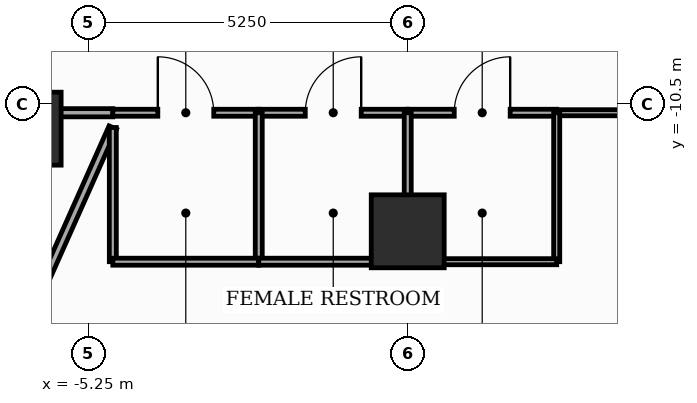
"""IFC4 building model, lengths in metres.
Left out: names, types, materials, properties, quantities, classifications, styles, units other than length and angle.
Written with IfcOpenShell. Run it as: python <this file> out.ifc"""

import sys

from ifc_helpers import new_model, si_unit, direction, frame, frame_2d, origin, origin_2d, place, context, subcontext, project, spatial, rectangle, extrude, element, fill, save


model = new_model("IFC4")
c1 = context("Model", 3, precision=1e-05, world=origin(), true_north=direction((0.0, 1.0)))
c2 = subcontext(c1, "Body", "Model", "MODEL_VIEW")
j1 = project(units=[si_unit("LENGTHUNIT", "METRE"), si_unit("PLANEANGLEUNIT", "RADIAN")], contexts=[c1])
p1 = place(None, origin())
s1 = spatial("IfcSite", under=j1, at=p1, CompositionType="ELEMENT")
p2 = place(p1, origin())
s2 = spatial("IfcBuilding", under=s1, at=p2, CompositionType="ELEMENT")
p3 = place(p2, frame((0.0, 0.0, 176.8)))
s3 = spatial("IfcBuildingStorey", under=s2, at=p3, CompositionType="ELEMENT", Elevation=176.8)
for number, where, z_axis, x_axis in (
    (1, (-6.3, -10.912, 0.0), (0.0, 0.0, 1.0), (1.0, 0.0, 0.0)),
    (2, (0.0, -12.6, 0.0), (0.0, 0.0, 1.0), (1.0, 0.0, 0.0)),
):
    element("IfcColumn", number, at=place(p3, frame(where, z_axis=z_axis, x_axis=x_axis)), inside=s3, PredefinedType="COLUMN", context=c2, shape_type="SweptSolid", body=[
        extrude(rectangle(XDim=1.2, YDim=1.2, at=origin_2d()), origin(), (0.0, 0.0, 1.0), 3.7),
    ])
p4 = place(p3, frame((-10.15, -10.65, 0.0), z_axis=(0.0, 0.0, 1.0), x_axis=(1.0, 0.0, 0.0)))
e3 = element("IfcWall", 3, at=p4, inside=s3, PredefinedType="PARTITIONING", context=c2, shape_type="SweptSolid", body=[
    extrude(rectangle(XDim=5.3, YDim=0.135, at=frame_2d((2.65, 0.0))), origin(), (0.0, 0.0, 1.0), 2.885),
])
p5 = place(p4, frame((0.585, 0.0, 0.0)))
e4 = element("IfcOpeningElement", 4, at=p5, cuts=e3, PredefinedType="OPENING", context=c2, shape_type="SweptSolid", body=[
    extrude(rectangle(XDim=0.95, YDim=2.1, at=frame_2d((0.475, 1.05))), frame((0.0, 0.077, 0.0), z_axis=(0.0, -1.0, 0.0), x_axis=(1.0, 0.0, 0.0)), (0.0, 0.0, 1.0), 0.155),
])
p6 = place(p3, frame((-4.85, -10.65, 0.0), z_axis=(0.0, 0.0, 1.0), x_axis=(1.0, 0.0, 0.0)))
e5 = element("IfcWall", 5, at=p6, inside=s3, PredefinedType="PARTITIONING", context=c2, shape_type="SweptSolid", body=[
    extrude(rectangle(XDim=2.4, YDim=0.115, at=frame_2d((1.2, 0.0))), origin(), (0.0, 0.0, 1.0), 3.5),
])
p7 = place(p6, frame((0.74, 0.0, 0.0)))
e6 = element("IfcOpeningElement", 6, at=p7, cuts=e5, PredefinedType="OPENING", context=c2, shape_type="SweptSolid", body=[
    extrude(rectangle(XDim=0.92, YDim=2.1, at=frame_2d((0.46, 1.05))), frame((0.0, 0.067, 0.0), z_axis=(0.0, -1.0, 0.0), x_axis=(1.0, 0.0, 0.0)), (0.0, 0.0, 1.0), 0.135),
])
p8 = place(p3, frame((-2.45, -10.65, 0.0), z_axis=(0.0, 0.0, 1.0), x_axis=(1.0, 0.0, 0.0)))
e7 = element("IfcWall", 7, at=p8, inside=s3, PredefinedType="PARTITIONING", context=c2, shape_type="SweptSolid", body=[
    extrude(rectangle(XDim=2.45, YDim=0.115, at=frame_2d((1.225, 0.0))), origin(), (0.0, 0.0, 1.0), 2.885),
])
p9 = place(p8, frame((0.765, 0.0, 0.0)))
e8 = element("IfcOpeningElement", 8, at=p9, cuts=e7, PredefinedType="OPENING", context=c2, shape_type="SweptSolid", body=[
    extrude(rectangle(XDim=0.92, YDim=2.1, at=frame_2d((0.46, 1.05))), frame((0.0, 0.067, 0.0), z_axis=(0.0, -1.0, 0.0), x_axis=(1.0, 0.0, 0.0)), (0.0, 0.0, 1.0), 0.135),
])
p10 = place(p3, frame((2.45, -10.65, 0.0), z_axis=(0.0, 0.0, 1.0), x_axis=(1.0, 0.0, 0.0)))
e9 = element("IfcWall", 9, at=p10, inside=s3, PredefinedType="MOVABLE", context=c2, shape_type="SweptSolid", body=[
    extrude(rectangle(XDim=7.7, YDim=0.1, at=frame_2d((3.85, 0.0))), origin(), (0.0, 0.0, 1.0), 2.885),
])
p11 = place(p3, frame((0.0, -10.65, 0.0), z_axis=(0.0, 0.0, 1.0), x_axis=(1.0, 0.0, 0.0)))
e10 = element("IfcWall", 10, at=p11, inside=s3, PredefinedType="PARTITIONING", context=c2, shape_type="SweptSolid", body=[
    extrude(rectangle(XDim=2.45, YDim=0.115, at=frame_2d((1.225, 0.0))), origin(), (0.0, 0.0, 1.0), 3.5),
])
p12 = place(p11, frame((0.765, 0.0, 0.0)))
e11 = element("IfcOpeningElement", 11, at=p12, cuts=e10, PredefinedType="OPENING", context=c2, shape_type="SweptSolid", body=[
    extrude(rectangle(XDim=0.92, YDim=2.1, at=frame_2d((0.46, 1.05))), frame((0.0, 0.067, 0.0), z_axis=(0.0, -1.0, 0.0), x_axis=(1.0, 0.0, 0.0)), (0.0, 0.0, 1.0), 0.135),
])
p13 = place(p3, frame((-6.402, -14.378, 0.0), z_axis=(0.0, 0.0, 1.0), x_axis=(0.406833086098, 0.913502512343, 0.0)))
e12 = element("IfcWall", 12, at=p13, inside=s3, PredefinedType="PARTITIONING", context=c2, shape_type="SweptSolid", body=[
    extrude(rectangle(XDim=3.815, YDim=0.135, at=frame_2d((1.907, 0.0))), origin(), (0.0, 0.0, 1.0), 2.885),
])
p14 = place(p3, frame((-2.45, -13.1, 0.0), z_axis=(0.0, 0.0, 1.0), x_axis=(0.0, 1.0, 0.0)))
e13 = element("IfcWall", 13, at=p14, inside=s3, PredefinedType="PARTITIONING", context=c2, shape_type="SweptSolid", body=[
    extrude(rectangle(XDim=2.45, YDim=0.115, at=frame_2d((1.225, 0.0))), origin(), (0.0, 0.0, 1.0), 2.885),
])
p15 = place(p3, frame((-4.85, -10.893, 0.0), z_axis=(0.0, 0.0, 1.0), x_axis=(0.0, -1.0, 0.0)))
e14 = element("IfcWall", 14, at=p15, inside=s3, PredefinedType="PARTITIONING", context=c2, shape_type="SweptSolid", body=[
    extrude(rectangle(XDim=2.207, YDim=0.115, at=frame_2d((1.104, 0.0))), origin(), (0.0, 0.0, 1.0), 2.885),
])
p16 = place(p3, frame((-4.85, -13.1, 0.0), z_axis=(0.0, 0.0, 1.0), x_axis=(1.0, 0.0, 0.0)))
e15 = element("IfcWall", 15, at=p16, inside=s3, PredefinedType="PARTITIONING", context=c2, shape_type="SweptSolid", body=[
    extrude(rectangle(XDim=2.4, YDim=0.115, at=frame_2d((1.2, 0.0))), origin(), (0.0, 0.0, 1.0), 3.5),
])
p17 = place(p3, frame((-2.45, -13.1, 0.0), z_axis=(0.0, 0.0, 1.0), x_axis=(1.0, 0.0, 0.0)))
e16 = element("IfcWall", 16, at=p17, inside=s3, PredefinedType="PARTITIONING", context=c2, shape_type="SweptSolid", body=[
    extrude(rectangle(XDim=2.45, YDim=0.115, at=frame_2d((1.225, 0.0))), origin(), (0.0, 0.0, 1.0), 2.885),
])
p18 = place(p3, frame((0.0, -13.1, 0.0), z_axis=(0.0, 0.0, 1.0), x_axis=(0.0, 1.0, 0.0)))
e17 = element("IfcWall", 17, at=p18, inside=s3, PredefinedType="PARTITIONING", context=c2, shape_type="SweptSolid", body=[
    extrude(rectangle(XDim=2.45, YDim=0.115, at=frame_2d((1.225, 0.0))), origin(), (0.0, 0.0, 1.0), 2.885),
])
p19 = place(p3, frame((2.45, -10.65, 0.0), z_axis=(0.0, 0.0, 1.0), x_axis=(0.0, -1.0, 0.0)))
e18 = element("IfcWall", 18, at=p19, inside=s3, PredefinedType="MOVABLE", context=c2, shape_type="SweptSolid", body=[
    extrude(rectangle(XDim=2.45, YDim=0.1, at=frame_2d((1.225, 0.0))), origin(), (0.0, 0.0, 1.0), 2.885),
])
p20 = place(p3, frame((2.45, -13.1, 0.0), z_axis=(0.0, 0.0, 1.0), x_axis=(-1.0, 0.0, 0.0)))
e19 = element("IfcWall", 19, at=p20, inside=s3, PredefinedType="MOVABLE", context=c2, shape_type="SweptSolid", body=[
    extrude(rectangle(XDim=2.45, YDim=0.1, at=frame_2d((1.225, 0.0))), origin(), (0.0, 0.0, 1.0), 2.885),
])
p21 = place(p7, origin())
e20 = element("IfcDoor", 20, at=p21, inside=s3, OperationType="SINGLE_SWING_LEFT", PredefinedType="DOOR", context=c2, shape_type="SweptSolid", body=[
    extrude(rectangle(XDim=0.92, YDim=2.1, at=frame_2d((0.46, 1.05))), frame((0.0, 0.025, 0.0), z_axis=(0.0, -1.0, 0.0), x_axis=(1.0, 0.0, 0.0)), (0.0, 0.0, 1.0), 0.05),
])
fill(e6, e20)
p22 = place(p9, origin())
e21 = element("IfcDoor", 21, at=p22, inside=s3, OperationType="SINGLE_SWING_RIGHT", PredefinedType="DOOR", context=c2, shape_type="SweptSolid", body=[
    extrude(rectangle(XDim=0.92, YDim=2.1, at=frame_2d((0.46, 1.05))), frame((0.0, 0.025, 0.0), z_axis=(0.0, -1.0, 0.0), x_axis=(1.0, 0.0, 0.0)), (0.0, 0.0, 1.0), 0.05),
])
fill(e8, e21)
p23 = place(p12, origin())
e22 = element("IfcDoor", 22, at=p23, inside=s3, OperationType="SINGLE_SWING_RIGHT", PredefinedType="DOOR", context=c2, shape_type="SweptSolid", body=[
    extrude(rectangle(XDim=0.92, YDim=2.1, at=frame_2d((0.46, 1.05))), frame((0.0, 0.025, 0.0), z_axis=(0.0, -1.0, 0.0), x_axis=(1.0, 0.0, 0.0)), (0.0, 0.0, 1.0), 0.05),
])
fill(e11, e22)
save(model, sys.argv[1])
